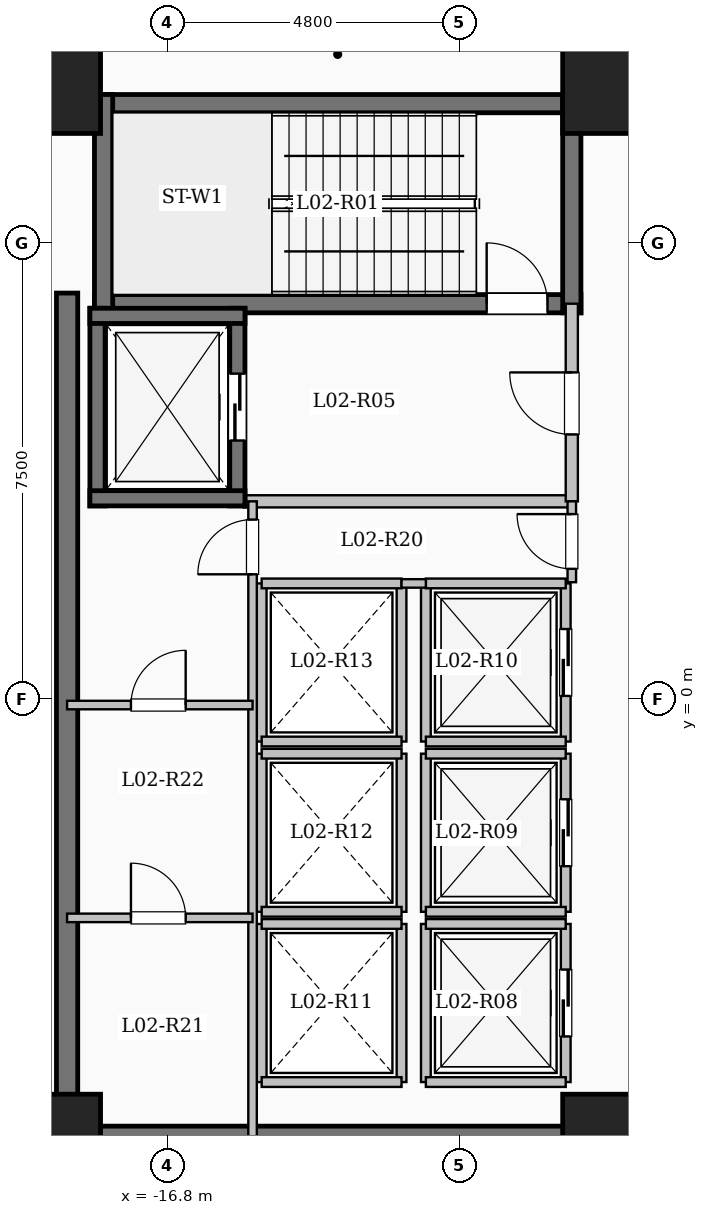
"""IFC4 building model, lengths in metres.
Left out: names, types, materials, properties, quantities, classifications, styles, units other than length and angle.
Written with IfcOpenShell. Run it as: python <this file> out.ifc"""

import sys

from ifc_helpers import new_model, si_unit, direction, frame, frame_2d, origin, origin_2d, place, context, subcontext, project, spatial, rectangle, extrude, element, fill, save


model = new_model("IFC4")
c1 = context("Model", 3, precision=1e-05, world=origin(), true_north=direction((0.0, 1.0)))
c2 = subcontext(c1, "Body", "Model", "MODEL_VIEW")
j1 = project(units=[si_unit("LENGTHUNIT", "METRE"), si_unit("PLANEANGLEUNIT", "RADIAN")], contexts=[c1])
p1 = place(None, origin())
s1 = spatial("IfcSite", under=j1, at=p1, CompositionType="ELEMENT")
p2 = place(p1, origin())
s2 = spatial("IfcBuilding", under=s1, at=p2, CompositionType="ELEMENT")
p3 = place(p2, frame((0.0, 0.0, 9.9)))
s3 = spatial("IfcBuildingStorey", under=s2, at=p3, CompositionType="ELEMENT", Elevation=9.9)
for number, where, z_axis, x_axis in (
    (1, (-9.6, -7.2, 0.0), (0.0, 0.0, 1.0), (1.0, 0.0, 0.0)),
    (2, (-9.6, 10.0, 0.0), (0.0, 0.0, 1.0), (1.0, 0.0, 0.0)),
    (3, (-18.6, -7.2, 0.0), (0.0, 0.0, 1.0), (1.0, 0.0, 0.0)),
    (4, (-18.6, 10.0, 0.0), (0.0, 0.0, 1.0), (1.0, 0.0, 0.0)),
):
    element("IfcColumn", number, at=place(p3, frame(where, z_axis=z_axis, x_axis=x_axis)), inside=s3, PredefinedType="COLUMN", context=c2, shape_type="SweptSolid", body=[
        extrude(rectangle(XDim=1.4, YDim=1.4, at=origin_2d()), origin(), (0.0, 0.0, 1.0), 4.5),
    ])
p4 = place(p3, frame((-18.0, 9.79, 0.0), z_axis=(0.0, 0.0, 1.0), x_axis=(1.0, 0.0, 0.0)))
e5 = element("IfcWall", 5, at=p4, inside=s3, PredefinedType="SHEAR", context=c2, shape_type="SweptSolid", body=[
    extrude(rectangle(XDim=8.0, YDim=0.3, at=frame_2d((4.0, 0.0))), origin(), (0.0, 0.0, 1.0), 4.5),
])
p5 = place(p3, frame((-18.0, 6.5, 0.0), z_axis=(0.0, 0.0, 1.0), x_axis=(1.0, 0.0, 0.0)))
e6 = element("IfcWall", 6, at=p5, inside=s3, PredefinedType="SHEAR", context=c2, shape_type="SweptSolid", body=[
    extrude(rectangle(XDim=8.0, YDim=0.3, at=frame_2d((4.0, 0.0))), origin(), (0.0, 0.0, 1.0), 4.5),
])
p6 = place(p5, frame((6.45, 0.0, 0.0)))
e7 = element("IfcOpeningElement", 7, at=p6, cuts=e6, PredefinedType="OPENING", context=c2, shape_type="SweptSolid", body=[
    extrude(rectangle(XDim=1.0, YDim=2.15, at=frame_2d((0.5, 1.075))), frame((0.0, 0.16, 0.0), z_axis=(0.0, -1.0, 0.0), x_axis=(1.0, 0.0, 0.0)), (0.0, 0.0, 1.0), 0.32),
])
for number, where, z_axis, x_axis in (
    (8, (-17.85, 6.35, 0.0), (0.0, 0.0, 1.0), (0.0, 1.0, 0.0)),
    (9, (-10.15, 6.35, 0.0), (0.0, 0.0, 1.0), (0.0, 1.0, 0.0)),
):
    element("IfcWall", number, at=place(p3, frame(where, z_axis=z_axis, x_axis=x_axis)), inside=s3, PredefinedType="SHEAR", context=c2, shape_type="SweptSolid", body=[
        extrude(rectangle(XDim=3.59, YDim=0.3, at=frame_2d((1.795, 0.0))), origin(), (0.0, 0.0, 1.0), 4.5),
    ])
p7 = place(p3, frame((-15.55, 3.25, 0.0), z_axis=(0.0, 0.0, 1.0), x_axis=(1.0, 0.0, 0.0)))
e10 = element("IfcWall", 10, at=p7, inside=s3, PredefinedType="SOLIDWALL", context=c2, shape_type="SweptSolid", body=[
    extrude(rectangle(XDim=5.4, YDim=0.2, at=frame_2d((2.7, 0.0))), origin(), (0.0, 0.0, 1.0), 4.2),
])
p8 = place(p3, frame((-10.15, 3.25, 0.0), z_axis=(0.0, 0.0, 1.0), x_axis=(0.0, 1.0, 0.0)))
e11 = element("IfcWall", 11, at=p8, inside=s3, PredefinedType="SOLIDWALL", context=c2, shape_type="SweptSolid", body=[
    extrude(rectangle(XDim=3.25, YDim=0.2, at=frame_2d((1.625, 0.0))), origin(), (0.0, 0.0, 1.0), 4.2),
])
p9 = place(p8, frame((1.1, 0.0, 0.0)))
e12 = element("IfcOpeningElement", 12, at=p9, cuts=e11, PredefinedType="OPENING", context=c2, shape_type="SweptSolid", body=[
    extrude(rectangle(XDim=1.02, YDim=2.15, at=frame_2d((0.51, 1.075))), frame((0.0, 0.11, 0.0), z_axis=(0.0, -1.0, 0.0), x_axis=(1.0, 0.0, 0.0)), (0.0, 0.0, 1.0), 0.22),
])
p10 = place(p3, frame((-17.95, 3.175, 0.0), z_axis=(0.0, 0.0, 1.0), x_axis=(0.0, 1.0, 0.0)))
e13 = element("IfcWall", 13, at=p10, inside=s3, PredefinedType="SHEAR", context=c2, shape_type="SweptSolid", body=[
    extrude(rectangle(XDim=3.25, YDim=0.25, at=frame_2d((1.625, 0.0))), origin(), (0.0, 0.0, 1.0), 4.5),
])
p11 = place(p3, frame((-15.65, 3.175, 0.0), z_axis=(0.0, 0.0, 1.0), x_axis=(0.0, 1.0, 0.0)))
e14 = element("IfcWall", 14, at=p11, inside=s3, PredefinedType="SHEAR", context=c2, shape_type="SweptSolid", body=[
    extrude(rectangle(XDim=3.25, YDim=0.25, at=frame_2d((1.625, 0.0))), origin(), (0.0, 0.0, 1.0), 4.5),
])
p12 = place(p11, frame((1.075, 0.0, 0.0)))
e15 = element("IfcOpeningElement", 15, at=p12, cuts=e14, PredefinedType="OPENING", context=c2, shape_type="SweptSolid", body=[
    extrude(rectangle(XDim=1.1, YDim=2.15, at=frame_2d((0.55, 1.075))), frame((0.0, 0.135, 0.0), z_axis=(0.0, -1.0, 0.0), x_axis=(1.0, 0.0, 0.0)), (0.0, 0.0, 1.0), 0.27),
])
for number, where, z_axis, x_axis in (
    (16, (-18.075, 3.3, 0.0), (0.0, 0.0, 1.0), (1.0, 0.0, 0.0)),
    (17, (-18.075, 6.3, 0.0), (0.0, 0.0, 1.0), (1.0, 0.0, 0.0)),
):
    element("IfcWall", number, at=place(p3, frame(where, z_axis=z_axis, x_axis=x_axis)), inside=s3, PredefinedType="SHEAR", context=c2, shape_type="SweptSolid", body=[
        extrude(rectangle(XDim=2.55, YDim=0.25, at=frame_2d((1.275, 0.0))), origin(), (0.0, 0.0, 1.0), 4.5),
    ])
p13 = place(p3, frame((-12.55, -6.3, 0.0), z_axis=(0.0, 0.0, 1.0), x_axis=(0.0, 1.0, 0.0)))
e18 = element("IfcWall", 18, at=p13, inside=s3, PredefinedType="SOLIDWALL", context=c2, shape_type="SweptSolid", body=[
    extrude(rectangle(XDim=2.6, YDim=0.16, at=frame_2d((1.3, 0.0))), origin(), (0.0, 0.0, 1.0), 4.2),
])
p14 = place(p3, frame((-10.25, -6.3, 0.0), z_axis=(0.0, 0.0, 1.0), x_axis=(0.0, 1.0, 0.0)))
e19 = element("IfcWall", 19, at=p14, inside=s3, PredefinedType="SOLIDWALL", context=c2, shape_type="SweptSolid", body=[
    extrude(rectangle(XDim=2.6, YDim=0.16, at=frame_2d((1.3, 0.0))), origin(), (0.0, 0.0, 1.0), 4.2),
])
p15 = place(p14, frame((0.75, 0.0, 0.0)))
e20 = element("IfcOpeningElement", 20, at=p15, cuts=e19, PredefinedType="OPENING", context=c2, shape_type="SweptSolid", body=[
    extrude(rectangle(XDim=1.1, YDim=2.15, at=frame_2d((0.55, 1.075))), frame((0.0, 0.09, 0.0), z_axis=(0.0, -1.0, 0.0), x_axis=(1.0, 0.0, 0.0)), (0.0, 0.0, 1.0), 0.18),
])
for number, where, z_axis, x_axis in (
    (21, (-12.55, -6.3, 0.0), (0.0, 0.0, 1.0), (1.0, 0.0, 0.0)),
    (22, (-12.55, -3.7, 0.0), (0.0, 0.0, 1.0), (1.0, 0.0, 0.0)),
):
    element("IfcWall", number, at=place(p3, frame(where, z_axis=z_axis, x_axis=x_axis)), inside=s3, PredefinedType="SOLIDWALL", context=c2, shape_type="SweptSolid", body=[
        extrude(rectangle(XDim=2.3, YDim=0.16, at=frame_2d((1.15, 0.0))), origin(), (0.0, 0.0, 1.0), 4.2),
    ])
p16 = place(p3, frame((-12.55, -3.5, 0.0), z_axis=(0.0, 0.0, 1.0), x_axis=(0.0, 1.0, 0.0)))
e23 = element("IfcWall", 23, at=p16, inside=s3, PredefinedType="SOLIDWALL", context=c2, shape_type="SweptSolid", body=[
    extrude(rectangle(XDim=2.6, YDim=0.16, at=frame_2d((1.3, 0.0))), origin(), (0.0, 0.0, 1.0), 4.2),
])
p17 = place(p3, frame((-10.25, -3.5, 0.0), z_axis=(0.0, 0.0, 1.0), x_axis=(0.0, 1.0, 0.0)))
e24 = element("IfcWall", 24, at=p17, inside=s3, PredefinedType="SOLIDWALL", context=c2, shape_type="SweptSolid", body=[
    extrude(rectangle(XDim=2.6, YDim=0.16, at=frame_2d((1.3, 0.0))), origin(), (0.0, 0.0, 1.0), 4.2),
])
p18 = place(p17, frame((0.75, 0.0, 0.0)))
e25 = element("IfcOpeningElement", 25, at=p18, cuts=e24, PredefinedType="OPENING", context=c2, shape_type="SweptSolid", body=[
    extrude(rectangle(XDim=1.1, YDim=2.15, at=frame_2d((0.55, 1.075))), frame((0.0, 0.09, 0.0), z_axis=(0.0, -1.0, 0.0), x_axis=(1.0, 0.0, 0.0)), (0.0, 0.0, 1.0), 0.18),
])
for number, where, z_axis, x_axis in (
    (26, (-12.55, -3.5, 0.0), (0.0, 0.0, 1.0), (1.0, 0.0, 0.0)),
    (27, (-12.55, -0.9, 0.0), (0.0, 0.0, 1.0), (1.0, 0.0, 0.0)),
):
    element("IfcWall", number, at=place(p3, frame(where, z_axis=z_axis, x_axis=x_axis)), inside=s3, PredefinedType="SOLIDWALL", context=c2, shape_type="SweptSolid", body=[
        extrude(rectangle(XDim=2.3, YDim=0.16, at=frame_2d((1.15, 0.0))), origin(), (0.0, 0.0, 1.0), 4.2),
    ])
p19 = place(p3, frame((-12.55, -0.7, 0.0), z_axis=(0.0, 0.0, 1.0), x_axis=(0.0, 1.0, 0.0)))
e28 = element("IfcWall", 28, at=p19, inside=s3, PredefinedType="SOLIDWALL", context=c2, shape_type="SweptSolid", body=[
    extrude(rectangle(XDim=2.6, YDim=0.16, at=frame_2d((1.3, 0.0))), origin(), (0.0, 0.0, 1.0), 4.2),
])
p20 = place(p3, frame((-10.25, -0.7, 0.0), z_axis=(0.0, 0.0, 1.0), x_axis=(0.0, 1.0, 0.0)))
e29 = element("IfcWall", 29, at=p20, inside=s3, PredefinedType="SOLIDWALL", context=c2, shape_type="SweptSolid", body=[
    extrude(rectangle(XDim=2.6, YDim=0.16, at=frame_2d((1.3, 0.0))), origin(), (0.0, 0.0, 1.0), 4.2),
])
p21 = place(p20, frame((0.75, 0.0, 0.0)))
e30 = element("IfcOpeningElement", 30, at=p21, cuts=e29, PredefinedType="OPENING", context=c2, shape_type="SweptSolid", body=[
    extrude(rectangle(XDim=1.1, YDim=2.15, at=frame_2d((0.55, 1.075))), frame((0.0, 0.09, 0.0), z_axis=(0.0, -1.0, 0.0), x_axis=(1.0, 0.0, 0.0)), (0.0, 0.0, 1.0), 0.18),
])
for number, where, z_axis, x_axis in (
    (31, (-12.55, -0.7, 0.0), (0.0, 0.0, 1.0), (1.0, 0.0, 0.0)),
    (32, (-12.55, 1.9, 0.0), (0.0, 0.0, 1.0), (1.0, 0.0, 0.0)),
):
    element("IfcWall", number, at=place(p3, frame(where, z_axis=z_axis, x_axis=x_axis)), inside=s3, PredefinedType="SOLIDWALL", context=c2, shape_type="SweptSolid", body=[
        extrude(rectangle(XDim=2.3, YDim=0.16, at=frame_2d((1.15, 0.0))), origin(), (0.0, 0.0, 1.0), 4.2),
    ])
for number, where, z_axis, x_axis in (
    (33, (-15.25, -6.3, 0.0), (0.0, 0.0, 1.0), (0.0, 1.0, 0.0)),
    (34, (-12.95, -6.3, 0.0), (0.0, 0.0, 1.0), (0.0, 1.0, 0.0)),
):
    element("IfcWall", number, at=place(p3, frame(where, z_axis=z_axis, x_axis=x_axis)), inside=s3, PredefinedType="SOLIDWALL", context=c2, shape_type="SweptSolid", body=[
        extrude(rectangle(XDim=2.6, YDim=0.16, at=frame_2d((1.3, 0.0))), origin(), (0.0, 0.0, 1.0), 4.2),
    ])
for number, where, z_axis, x_axis in (
    (35, (-15.25, -6.3, 0.0), (0.0, 0.0, 1.0), (1.0, 0.0, 0.0)),
    (36, (-15.25, -3.7, 0.0), (0.0, 0.0, 1.0), (1.0, 0.0, 0.0)),
):
    element("IfcWall", number, at=place(p3, frame(where, z_axis=z_axis, x_axis=x_axis)), inside=s3, PredefinedType="SOLIDWALL", context=c2, shape_type="SweptSolid", body=[
        extrude(rectangle(XDim=2.3, YDim=0.16, at=frame_2d((1.15, 0.0))), origin(), (0.0, 0.0, 1.0), 4.2),
    ])
for number, where, z_axis, x_axis in (
    (37, (-15.25, -3.5, 0.0), (0.0, 0.0, 1.0), (0.0, 1.0, 0.0)),
    (38, (-12.95, -3.5, 0.0), (0.0, 0.0, 1.0), (0.0, 1.0, 0.0)),
):
    element("IfcWall", number, at=place(p3, frame(where, z_axis=z_axis, x_axis=x_axis)), inside=s3, PredefinedType="SOLIDWALL", context=c2, shape_type="SweptSolid", body=[
        extrude(rectangle(XDim=2.6, YDim=0.16, at=frame_2d((1.3, 0.0))), origin(), (0.0, 0.0, 1.0), 4.2),
    ])
for number, where, z_axis, x_axis in (
    (39, (-15.25, -3.5, 0.0), (0.0, 0.0, 1.0), (1.0, 0.0, 0.0)),
    (40, (-15.25, -0.9, 0.0), (0.0, 0.0, 1.0), (1.0, 0.0, 0.0)),
):
    element("IfcWall", number, at=place(p3, frame(where, z_axis=z_axis, x_axis=x_axis)), inside=s3, PredefinedType="SOLIDWALL", context=c2, shape_type="SweptSolid", body=[
        extrude(rectangle(XDim=2.3, YDim=0.16, at=frame_2d((1.15, 0.0))), origin(), (0.0, 0.0, 1.0), 4.2),
    ])
for number, where, z_axis, x_axis in (
    (41, (-15.25, -0.7, 0.0), (0.0, 0.0, 1.0), (0.0, 1.0, 0.0)),
    (42, (-12.95, -0.7, 0.0), (0.0, 0.0, 1.0), (0.0, 1.0, 0.0)),
):
    element("IfcWall", number, at=place(p3, frame(where, z_axis=z_axis, x_axis=x_axis)), inside=s3, PredefinedType="SOLIDWALL", context=c2, shape_type="SweptSolid", body=[
        extrude(rectangle(XDim=2.6, YDim=0.16, at=frame_2d((1.3, 0.0))), origin(), (0.0, 0.0, 1.0), 4.2),
    ])
for number, where, z_axis, x_axis in (
    (43, (-15.25, -0.7, 0.0), (0.0, 0.0, 1.0), (1.0, 0.0, 0.0)),
    (44, (-15.25, 1.9, 0.0), (0.0, 0.0, 1.0), (1.0, 0.0, 0.0)),
):
    element("IfcWall", number, at=place(p3, frame(where, z_axis=z_axis, x_axis=x_axis)), inside=s3, PredefinedType="SOLIDWALL", context=c2, shape_type="SweptSolid", body=[
        extrude(rectangle(XDim=2.3, YDim=0.16, at=frame_2d((1.15, 0.0))), origin(), (0.0, 0.0, 1.0), 4.2),
    ])
p22 = place(p3, frame((-18.45, -7.375, 0.0), z_axis=(0.0, 0.0, 1.0), x_axis=(0.0, 1.0, 0.0)))
e45 = element("IfcWall", 45, at=p22, inside=s3, PredefinedType="SHEAR", context=c2, shape_type="SweptSolid", body=[
    extrude(rectangle(XDim=14.05, YDim=0.35, at=frame_2d((7.025, 0.0))), origin(), (0.0, 0.0, 1.0), 4.5),
])
p23 = place(p3, frame((-18.625, -7.2, 0.0), z_axis=(0.0, 0.0, 1.0), x_axis=(1.0, 0.0, 0.0)))
e46 = element("IfcWall", 46, at=p23, inside=s3, PredefinedType="SHEAR", context=c2, shape_type="SweptSolid", body=[
    extrude(rectangle(XDim=8.55, YDim=0.35, at=frame_2d((4.275, 0.0))), origin(), (0.0, 0.0, 1.0), 4.5),
])
p24 = place(p3, frame((-12.95, 1.9, 0.0), z_axis=(0.0, 0.0, 1.0), x_axis=(1.0, 0.0, 0.0)))
e47 = element("IfcWall", 47, at=p24, inside=s3, PredefinedType="PARTITIONING", context=c2, shape_type="SweptSolid", body=[
    extrude(rectangle(XDim=0.4, YDim=0.14, at=frame_2d((0.2, 0.0))), origin(), (0.0, 0.0, 1.0), 4.2),
])
p25 = place(p3, frame((-10.15, 1.92, 0.0), z_axis=(0.0, 0.0, 1.0), x_axis=(0.0, 1.0, 0.0)))
e48 = element("IfcWall", 48, at=p25, inside=s3, PredefinedType="PARTITIONING", context=c2, shape_type="SweptSolid", body=[
    extrude(rectangle(XDim=1.33, YDim=0.14, at=frame_2d((0.665, 0.0))), origin(), (0.0, 0.0, 1.0), 4.2),
])
p26 = place(p25, frame((0.22, 0.0, 0.0)))
e49 = element("IfcOpeningElement", 49, at=p26, cuts=e48, PredefinedType="OPENING", context=c2, shape_type="SweptSolid", body=[
    extrude(rectangle(XDim=0.9, YDim=2.08, at=frame_2d((0.45, 1.04))), frame((0.0, 0.08, 0.0), z_axis=(0.0, -1.0, 0.0), x_axis=(1.0, 0.0, 0.0)), (0.0, 0.0, 1.0), 0.16),
])
p27 = place(p3, frame((-15.4, -7.2, 0.0), z_axis=(0.0, 0.0, 1.0), x_axis=(0.0, 1.0, 0.0)))
e50 = element("IfcWall", 50, at=p27, inside=s3, PredefinedType="PARTITIONING", context=c2, shape_type="SweptSolid", body=[
    extrude(rectangle(XDim=10.45, YDim=0.14, at=frame_2d((5.225, 0.0))), origin(), (0.0, 0.0, 1.0), 4.2),
])
p28 = place(p27, frame((9.25, 0.0, 0.0)))
e51 = element("IfcOpeningElement", 51, at=p28, cuts=e50, PredefinedType="OPENING", context=c2, shape_type="SweptSolid", body=[
    extrude(rectangle(XDim=0.9, YDim=2.08, at=frame_2d((0.45, 1.04))), frame((0.0, 0.08, 0.0), z_axis=(0.0, -1.0, 0.0), x_axis=(1.0, 0.0, 0.0)), (0.0, 0.0, 1.0), 0.16),
])
p29 = place(p3, frame((-18.45, -3.6, 0.0), z_axis=(0.0, 0.0, 1.0), x_axis=(1.0, 0.0, 0.0)))
e52 = element("IfcWall", 52, at=p29, inside=s3, PredefinedType="PARTITIONING", context=c2, shape_type="SweptSolid", body=[
    extrude(rectangle(XDim=3.05, YDim=0.14, at=frame_2d((1.525, 0.0))), origin(), (0.0, 0.0, 1.0), 4.2),
])
p30 = place(p29, frame((1.05, 0.0, 0.0)))
e53 = element("IfcOpeningElement", 53, at=p30, cuts=e52, PredefinedType="OPENING", context=c2, shape_type="SweptSolid", body=[
    extrude(rectangle(XDim=0.9, YDim=2.08, at=frame_2d((0.45, 1.04))), frame((0.0, 0.08, 0.0), z_axis=(0.0, -1.0, 0.0), x_axis=(1.0, 0.0, 0.0)), (0.0, 0.0, 1.0), 0.16),
])
p31 = place(p3, frame((-18.45, -0.1, 0.0), z_axis=(0.0, 0.0, 1.0), x_axis=(1.0, 0.0, 0.0)))
e54 = element("IfcWall", 54, at=p31, inside=s3, PredefinedType="PARTITIONING", context=c2, shape_type="SweptSolid", body=[
    extrude(rectangle(XDim=3.05, YDim=0.14, at=frame_2d((1.525, 0.0))), origin(), (0.0, 0.0, 1.0), 4.2),
])
p32 = place(p31, frame((1.05, 0.0, 0.0)))
e55 = element("IfcOpeningElement", 55, at=p32, cuts=e54, PredefinedType="OPENING", context=c2, shape_type="SweptSolid", body=[
    extrude(rectangle(XDim=0.9, YDim=2.08, at=frame_2d((0.45, 1.04))), frame((0.0, 0.08, 0.0), z_axis=(0.0, -1.0, 0.0), x_axis=(1.0, 0.0, 0.0)), (0.0, 0.0, 1.0), 0.16),
])
p33 = place(p3, frame((-28.88, -7.25, 0.0), z_axis=(0.0, 0.0, 1.0), x_axis=(1.0, 0.0, 0.0)))
e56 = element("IfcWall", 56, at=p33, inside=s3, PredefinedType="PARTITIONING", context=c2, shape_type="SweptSolid", body=[
    extrude(rectangle(XDim=10.43, YDim=0.15, at=frame_2d((5.215, 0.0))), origin(), (0.0, 0.0, 1.0), 4.2),
])
p34 = place(p33, frame((2.5, 0.0, 0.0)))
e57 = element("IfcOpeningElement", 57, at=p34, cuts=e56, PredefinedType="OPENING", context=c2, shape_type="SweptSolid", body=[
    extrude(rectangle(XDim=1.08, YDim=2.15, at=frame_2d((0.54, 1.075))), frame((0.0, 0.085, 0.0), z_axis=(0.0, -1.0, 0.0), x_axis=(1.0, 0.0, 0.0)), (0.0, 0.0, 1.0), 0.17),
])
p35 = place(p6, origin())
e58 = element("IfcDoor", 58, at=p35, inside=s3, OperationType="SINGLE_SWING_LEFT", PredefinedType="DOOR", context=c2, shape_type="SweptSolid", body=[
    extrude(rectangle(XDim=1.0, YDim=2.15, at=frame_2d((0.5, 1.075))), frame((0.0, 0.025, 0.0), z_axis=(0.0, -1.0, 0.0), x_axis=(1.0, 0.0, 0.0)), (0.0, 0.0, 1.0), 0.05),
])
fill(e7, e58)
p36 = place(p9, origin())
e59 = element("IfcDoor", 59, at=p36, inside=s3, OperationType="SINGLE_SWING_RIGHT", PredefinedType="DOOR", context=c2, shape_type="SweptSolid", body=[
    extrude(rectangle(XDim=1.02, YDim=2.15, at=frame_2d((0.51, 1.075))), frame((0.0, 0.025, 0.0), z_axis=(0.0, -1.0, 0.0), x_axis=(1.0, 0.0, 0.0)), (0.0, 0.0, 1.0), 0.05),
])
fill(e12, e59)
p37 = place(p12, origin())
e60 = element("IfcDoor", 60, at=p37, inside=s3, OperationType="SLIDING_TO_LEFT", PredefinedType="DOOR", context=c2, shape_type="SweptSolid", body=[
    extrude(rectangle(XDim=1.1, YDim=2.15, at=frame_2d((0.55, 1.075))), frame((0.0, 0.025, 0.0), z_axis=(0.0, -1.0, 0.0), x_axis=(1.0, 0.0, 0.0)), (0.0, 0.0, 1.0), 0.05),
])
fill(e15, e60)
p38 = place(p15, origin())
e61 = element("IfcDoor", 61, at=p38, inside=s3, OperationType="SLIDING_TO_LEFT", PredefinedType="DOOR", context=c2, shape_type="SweptSolid", body=[
    extrude(rectangle(XDim=1.1, YDim=2.15, at=frame_2d((0.55, 1.075))), frame((0.0, 0.025, 0.0), z_axis=(0.0, -1.0, 0.0), x_axis=(1.0, 0.0, 0.0)), (0.0, 0.0, 1.0), 0.05),
])
fill(e20, e61)
p39 = place(p18, origin())
e62 = element("IfcDoor", 62, at=p39, inside=s3, OperationType="SLIDING_TO_LEFT", PredefinedType="DOOR", context=c2, shape_type="SweptSolid", body=[
    extrude(rectangle(XDim=1.1, YDim=2.15, at=frame_2d((0.55, 1.075))), frame((0.0, 0.025, 0.0), z_axis=(0.0, -1.0, 0.0), x_axis=(1.0, 0.0, 0.0)), (0.0, 0.0, 1.0), 0.05),
])
fill(e25, e62)
p40 = place(p21, origin())
e63 = element("IfcDoor", 63, at=p40, inside=s3, OperationType="SLIDING_TO_LEFT", PredefinedType="DOOR", context=c2, shape_type="SweptSolid", body=[
    extrude(rectangle(XDim=1.1, YDim=2.15, at=frame_2d((0.55, 1.075))), frame((0.0, 0.025, 0.0), z_axis=(0.0, -1.0, 0.0), x_axis=(1.0, 0.0, 0.0)), (0.0, 0.0, 1.0), 0.05),
])
fill(e30, e63)
p41 = place(p26, origin())
e64 = element("IfcDoor", 64, at=p41, inside=s3, OperationType="SINGLE_SWING_RIGHT", PredefinedType="DOOR", context=c2, shape_type="SweptSolid", body=[
    extrude(rectangle(XDim=0.9, YDim=2.08, at=frame_2d((0.45, 1.04))), frame((0.0, 0.025, 0.0), z_axis=(0.0, -1.0, 0.0), x_axis=(1.0, 0.0, 0.0)), (0.0, 0.0, 1.0), 0.05),
])
fill(e49, e64)
p42 = place(p28, origin())
e65 = element("IfcDoor", 65, at=p42, inside=s3, OperationType="SINGLE_SWING_LEFT", PredefinedType="DOOR", context=c2, shape_type="SweptSolid", body=[
    extrude(rectangle(XDim=0.9, YDim=2.08, at=frame_2d((0.45, 1.04))), frame((0.0, 0.025, 0.0), z_axis=(0.0, -1.0, 0.0), x_axis=(1.0, 0.0, 0.0)), (0.0, 0.0, 1.0), 0.05),
])
fill(e51, e65)
p43 = place(p32, origin())
e66 = element("IfcDoor", 66, at=p43, inside=s3, OperationType="SINGLE_SWING_RIGHT", PredefinedType="DOOR", context=c2, shape_type="SweptSolid", body=[
    extrude(rectangle(XDim=0.9, YDim=2.08, at=frame_2d((0.45, 1.04))), frame((0.0, 0.025, 0.0), z_axis=(0.0, -1.0, 0.0), x_axis=(1.0, 0.0, 0.0)), (0.0, 0.0, 1.0), 0.05),
])
fill(e55, e66)
p44 = place(p30, origin())
e67 = element("IfcDoor", 67, at=p44, inside=s3, OperationType="SINGLE_SWING_LEFT", PredefinedType="DOOR", context=c2, shape_type="SweptSolid", body=[
    extrude(rectangle(XDim=0.9, YDim=2.08, at=frame_2d((0.45, 1.04))), frame((0.0, 0.025, 0.0), z_axis=(0.0, -1.0, 0.0), x_axis=(1.0, 0.0, 0.0)), (0.0, 0.0, 1.0), 0.05),
])
fill(e53, e67)
save(model, sys.argv[1])
